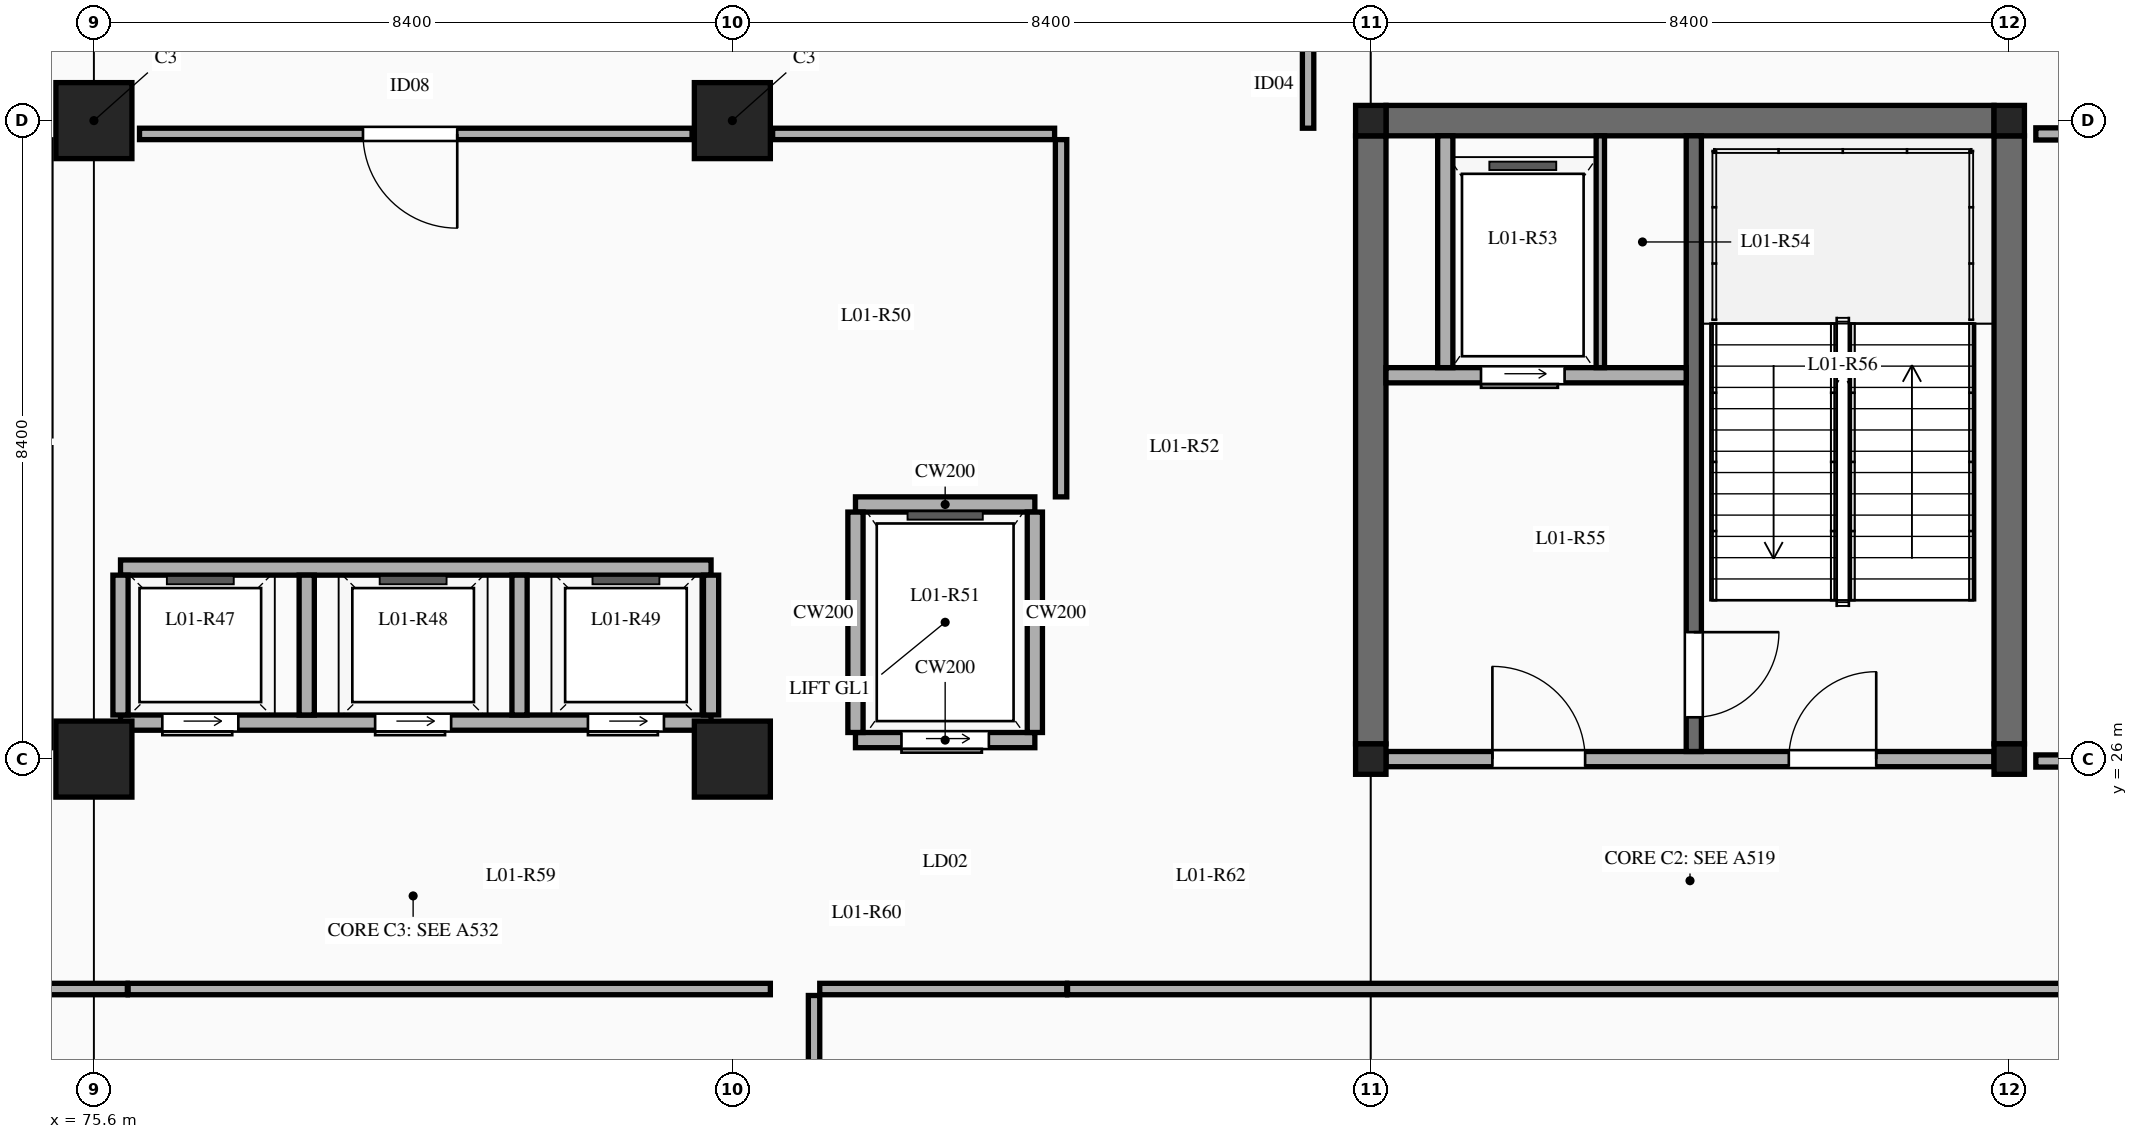
"""IFC4 building model, lengths in metres.
Left out: names, types, materials, properties, quantities, classifications, styles, units other than length and angle.
Written with IfcOpenShell. Run it as: python <this file> out.ifc"""

import sys

from ifc_helpers import new_model, si_unit, direction, frame, frame_2d, origin, origin_2d, place, context, subcontext, project, spatial, rectangle, extrude, element, fill, save


model = new_model("IFC4")
c1 = context("Model", 3, precision=1e-05, world=origin(), true_north=direction((0.0, 1.0)))
c2 = subcontext(c1, "Body", "Model", "MODEL_VIEW")
j1 = project(units=[si_unit("LENGTHUNIT", "METRE"), si_unit("PLANEANGLEUNIT", "RADIAN")], contexts=[c1])
p1 = place(None, origin())
s1 = spatial("IfcSite", under=j1, at=p1, CompositionType="ELEMENT")
p2 = place(p1, origin())
s2 = spatial("IfcBuilding", under=s1, at=p2, CompositionType="ELEMENT")
p3 = place(p2, frame((0.0, 0.0, 5.4)))
s3 = spatial("IfcBuildingStorey", under=s2, at=p3, CompositionType="ELEMENT", Elevation=5.4)
for number, where, z_axis, x_axis in (
    (1, (75.6, 26.0, 0.0), (0.0, 0.0, 1.0), (1.0, 0.0, 0.0)),
    (2, (75.6, 34.4, 0.0), (0.0, 0.0, 1.0), (1.0, 0.0, 0.0)),
    (3, (84.0, 26.0, 0.0), (0.0, 0.0, 1.0), (1.0, 0.0, 0.0)),
    (4, (84.0, 34.4, 0.0), (0.0, 0.0, 1.0), (1.0, 0.0, 0.0)),
):
    element("IfcColumn", number, at=place(p3, frame(where, z_axis=z_axis, x_axis=x_axis)), inside=s3, PredefinedType="COLUMN", context=c2, shape_type="SweptSolid", body=[
        extrude(rectangle(XDim=1.0, YDim=1.0, at=origin_2d()), origin(), (0.0, 0.0, 1.0), 4.8),
    ])
for number, where, z_axis, x_axis in (
    (5, (92.4, 26.0, 0.0), (0.0, 0.0, 1.0), (1.0, 0.0, 0.0)),
    (6, (92.4, 34.4, 0.0), (0.0, 0.0, 1.0), (1.0, 0.0, 0.0)),
    (7, (100.8, 26.0, 0.0), (0.0, 0.0, 1.0), (1.0, 0.0, 0.0)),
    (8, (100.8, 34.4, 0.0), (0.0, 0.0, 1.0), (1.0, 0.0, 0.0)),
):
    element("IfcColumn", number, at=place(p3, frame(where, z_axis=z_axis, x_axis=x_axis)), inside=s3, PredefinedType="COLUMN", context=c2, shape_type="SweptSolid", body=[
        extrude(rectangle(XDim=0.4, YDim=0.4, at=origin_2d()), origin(), (0.0, 0.0, 1.0), 4.8),
    ])
for number, where, z_axis, x_axis in (
    (9, (92.4, 26.2, 0.0), (0.0, 0.0, 1.0), (0.0, 1.0, 0.0)),
    (10, (100.8, 26.2, 0.0), (0.0, 0.0, 1.0), (0.0, 1.0, 0.0)),
    (11, (92.6, 34.4, 0.0), (0.0, 0.0, 1.0), (1.0, 0.0, 0.0)),
):
    element("IfcWall", number, at=place(p3, frame(where, z_axis=z_axis, x_axis=x_axis)), inside=s3, PredefinedType="SHEAR", context=c2, shape_type="SweptSolid", body=[
        extrude(rectangle(XDim=8.0, YDim=0.4, at=frame_2d((4.0, 0.0))), origin(), (0.0, 0.0, 1.0), 4.8),
    ])
p4 = place(p3, frame((92.6, 26.0, 0.0), z_axis=(0.0, 0.0, 1.0), x_axis=(1.0, 0.0, 0.0)))
e12 = element("IfcWall", 12, at=p4, inside=s3, PredefinedType="SOLIDWALL", context=c2, shape_type="SweptSolid", body=[
    extrude(rectangle(XDim=8.0, YDim=0.2, at=frame_2d((4.0, 0.0))), origin(), (0.0, 0.0, 1.0), 3.88),
])
p5 = place(p4, frame((1.4, 0.0, 0.0)))
e13 = element("IfcOpeningElement", 13, at=p5, cuts=e12, PredefinedType="OPENING", context=c2, shape_type="SweptSolid", body=[
    extrude(rectangle(XDim=1.22, YDim=2.15, at=frame_2d((0.61, 1.075))), frame((0.0, 0.11, 0.0), z_axis=(0.0, -1.0, 0.0), x_axis=(1.0, 0.0, 0.0)), (0.0, 0.0, 1.0), 0.22),
])
p6 = place(p4, frame((5.3, 0.0, 0.0)))
e14 = element("IfcOpeningElement", 14, at=p6, cuts=e12, PredefinedType="OPENING", context=c2, shape_type="SweptSolid", body=[
    extrude(rectangle(XDim=1.15, YDim=2.15, at=frame_2d((0.575, 1.075))), frame((0.0, 0.11, 0.0), z_axis=(0.0, -1.0, 0.0), x_axis=(1.0, 0.0, 0.0)), (0.0, 0.0, 1.0), 0.22),
])
p7 = place(p3, frame((96.65, 26.1, 0.0), z_axis=(0.0, 0.0, 1.0), x_axis=(0.0, 1.0, 0.0)))
e15 = element("IfcWall", 15, at=p7, inside=s3, PredefinedType="SOLIDWALL", context=c2, shape_type="SweptSolid", body=[
    extrude(rectangle(XDim=8.1, YDim=0.2, at=frame_2d((4.05, 0.0))), origin(), (0.0, 0.0, 1.0), 4.58),
])
p8 = place(p7, frame((0.45, 0.0, 0.0)))
e16 = element("IfcOpeningElement", 16, at=p8, cuts=e15, PredefinedType="OPENING", context=c2, shape_type="SweptSolid", body=[
    extrude(rectangle(XDim=1.12, YDim=2.15, at=frame_2d((0.56, 1.075))), frame((0.0, 0.11, 0.0), z_axis=(0.0, -1.0, 0.0), x_axis=(1.0, 0.0, 0.0)), (0.0, 0.0, 1.0), 0.22),
])
p9 = place(p3, frame((92.6, 31.05, 0.0), z_axis=(0.0, 0.0, 1.0), x_axis=(1.0, 0.0, 0.0)))
e17 = element("IfcWall", 17, at=p9, inside=s3, PredefinedType="SOLIDWALL", context=c2, shape_type="SweptSolid", body=[
    extrude(rectangle(XDim=3.95, YDim=0.2, at=frame_2d((1.975, 0.0))), origin(), (0.0, 0.0, 1.0), 4.58),
])
p10 = place(p9, frame((1.25, 0.0, 0.0)))
e18 = element("IfcOpeningElement", 18, at=p10, cuts=e17, PredefinedType="OPENING", context=c2, shape_type="SweptSolid", body=[
    extrude(rectangle(XDim=1.1, YDim=2.15, at=frame_2d((0.55, 1.075))), frame((0.0, 0.11, 0.0), z_axis=(0.0, -1.0, 0.0), x_axis=(1.0, 0.0, 0.0)), (0.0, 0.0, 1.0), 0.22),
])
p11 = place(p3, frame((95.42, 31.15, 0.0), z_axis=(0.0, 0.0, 1.0), x_axis=(0.0, 1.0, 0.0)))
e19 = element("IfcWall", 19, at=p11, inside=s3, PredefinedType="PARTITIONING", context=c2, shape_type="SweptSolid", body=[
    extrude(rectangle(XDim=3.05, YDim=0.11, at=frame_2d((1.525, 0.0))), origin(), (0.0, 0.0, 1.0), 4.58),
])
p12 = place(p3, frame((93.38, 31.15, 0.0), z_axis=(0.0, 0.0, 1.0), x_axis=(0.0, 1.0, 0.0)))
e20 = element("IfcWall", 20, at=p12, inside=s3, PredefinedType="SOLIDWALL", context=c2, shape_type="SweptSolid", body=[
    extrude(rectangle(XDim=3.05, YDim=0.2, at=frame_2d((1.525, 0.0))), origin(), (0.0, 0.0, 1.0), 4.58),
])
p13 = place(p3, frame((75.95, 26.48, 0.0), z_axis=(0.0, 0.0, 1.0), x_axis=(1.0, 0.0, 0.0)))
e21 = element("IfcWall", 21, at=p13, inside=s3, PredefinedType="SOLIDWALL", context=c2, shape_type="SweptSolid", body=[
    extrude(rectangle(XDim=7.77, YDim=0.2, at=frame_2d((3.885, 0.0))), origin(), (0.0, 0.0, 1.0), 4.58),
])
p14 = place(p13, frame((0.55, 0.0, 0.0)))
e22 = element("IfcOpeningElement", 22, at=p14, cuts=e21, PredefinedType="OPENING", context=c2, shape_type="SweptSolid", body=[
    extrude(rectangle(XDim=1.0, YDim=2.15, at=frame_2d((0.5, 1.075))), frame((0.0, 0.11, 0.0), z_axis=(0.0, -1.0, 0.0), x_axis=(1.0, 0.0, 0.0)), (0.0, 0.0, 1.0), 0.22),
])
p15 = place(p13, frame((3.35, 0.0, 0.0)))
e23 = element("IfcOpeningElement", 23, at=p15, cuts=e21, PredefinedType="OPENING", context=c2, shape_type="SweptSolid", body=[
    extrude(rectangle(XDim=1.0, YDim=2.15, at=frame_2d((0.5, 1.075))), frame((0.0, 0.11, 0.0), z_axis=(0.0, -1.0, 0.0), x_axis=(1.0, 0.0, 0.0)), (0.0, 0.0, 1.0), 0.22),
])
p16 = place(p13, frame((6.15, 0.0, 0.0)))
e24 = element("IfcOpeningElement", 24, at=p16, cuts=e21, PredefinedType="OPENING", context=c2, shape_type="SweptSolid", body=[
    extrude(rectangle(XDim=1.0, YDim=2.15, at=frame_2d((0.5, 1.075))), frame((0.0, 0.11, 0.0), z_axis=(0.0, -1.0, 0.0), x_axis=(1.0, 0.0, 0.0)), (0.0, 0.0, 1.0), 0.22),
])
p17 = place(p3, frame((75.95, 28.52, 0.0), z_axis=(0.0, 0.0, 1.0), x_axis=(1.0, 0.0, 0.0)))
e25 = element("IfcWall", 25, at=p17, inside=s3, PredefinedType="SOLIDWALL", context=c2, shape_type="SweptSolid", body=[
    extrude(rectangle(XDim=7.77, YDim=0.2, at=frame_2d((3.885, 0.0))), origin(), (0.0, 0.0, 1.0), 4.58),
])
p18 = place(p3, frame((75.95, 26.58, 0.0), z_axis=(0.0, 0.0, 1.0), x_axis=(0.0, 1.0, 0.0)))
e26 = element("IfcWall", 26, at=p18, inside=s3, PredefinedType="SOLIDWALL", context=c2, shape_type="SweptSolid", body=[
    extrude(rectangle(XDim=1.84, YDim=0.2, at=frame_2d((0.92, 0.0))), origin(), (0.0, 0.0, 1.0), 3.93),
])
for number, where, z_axis, x_axis in (
    (27, (78.4, 26.58, 0.0), (0.0, 0.0, 1.0), (0.0, 1.0, 0.0)),
    (28, (81.2, 26.58, 0.0), (0.0, 0.0, 1.0), (0.0, 1.0, 0.0)),
):
    element("IfcWall", number, at=place(p3, frame(where, z_axis=z_axis, x_axis=x_axis)), inside=s3, PredefinedType="SOLIDWALL", context=c2, shape_type="SweptSolid", body=[
        extrude(rectangle(XDim=1.84, YDim=0.2, at=frame_2d((0.92, 0.0))), origin(), (0.0, 0.0, 1.0), 4.58),
    ])
p19 = place(p3, frame((83.72, 26.58, 0.0), z_axis=(0.0, 0.0, 1.0), x_axis=(0.0, 1.0, 0.0)))
e29 = element("IfcWall", 29, at=p19, inside=s3, PredefinedType="SOLIDWALL", context=c2, shape_type="SweptSolid", body=[
    extrude(rectangle(XDim=1.84, YDim=0.2, at=frame_2d((0.92, 0.0))), origin(), (0.0, 0.0, 1.0), 3.93),
])
p20 = place(p3, frame((85.62, 26.25, 0.0), z_axis=(0.0, 0.0, 1.0), x_axis=(1.0, 0.0, 0.0)))
e30 = element("IfcWall", 30, at=p20, inside=s3, PredefinedType="SOLIDWALL", context=c2, shape_type="SweptSolid", body=[
    extrude(rectangle(XDim=2.36, YDim=0.2, at=frame_2d((1.18, 0.0))), origin(), (0.0, 0.0, 1.0), 3.88),
])
p21 = place(p20, frame((0.605, 0.0, 0.0)))
e31 = element("IfcOpeningElement", 31, at=p21, cuts=e30, PredefinedType="OPENING", context=c2, shape_type="SweptSolid", body=[
    extrude(rectangle(XDim=1.15, YDim=2.2, at=frame_2d((0.575, 1.1))), frame((0.0, 0.11, 0.0), z_axis=(0.0, -1.0, 0.0), x_axis=(1.0, 0.0, 0.0)), (0.0, 0.0, 1.0), 0.22),
])
p22 = place(p3, frame((85.62, 29.35, 0.0), z_axis=(0.0, 0.0, 1.0), x_axis=(1.0, 0.0, 0.0)))
e32 = element("IfcWall", 32, at=p22, inside=s3, PredefinedType="SOLIDWALL", context=c2, shape_type="SweptSolid", body=[
    extrude(rectangle(XDim=2.36, YDim=0.2, at=frame_2d((1.18, 0.0))), origin(), (0.0, 0.0, 1.0), 4.58),
])
p23 = place(p3, frame((85.62, 26.35, 0.0), z_axis=(0.0, 0.0, 1.0), x_axis=(0.0, 1.0, 0.0)))
e33 = element("IfcWall", 33, at=p23, inside=s3, PredefinedType="SOLIDWALL", context=c2, shape_type="SweptSolid", body=[
    extrude(rectangle(XDim=2.9, YDim=0.2, at=frame_2d((1.45, 0.0))), origin(), (0.0, 0.0, 1.0), 4.58),
])
p24 = place(p3, frame((87.98, 26.35, 0.0), z_axis=(0.0, 0.0, 1.0), x_axis=(0.0, 1.0, 0.0)))
e34 = element("IfcWall", 34, at=p24, inside=s3, PredefinedType="SOLIDWALL", context=c2, shape_type="SweptSolid", body=[
    extrude(rectangle(XDim=2.9, YDim=0.2, at=frame_2d((1.45, 0.0))), origin(), (0.0, 0.0, 1.0), 4.23),
])
p25 = place(p3, frame((88.325, 29.45, 0.0), z_axis=(0.0, 0.0, 1.0), x_axis=(0.0, 1.0, 0.0)))
e35 = element("IfcWall", 35, at=p25, inside=s3, PredefinedType="PARTITIONING", context=c2, shape_type="SweptSolid", body=[
    extrude(rectangle(XDim=4.7, YDim=0.15, at=frame_2d((2.35, 0.0))), origin(), (0.0, 0.0, 1.0), 2.95),
])
p26 = place(p3, frame((76.2, 34.225, 0.0), z_axis=(0.0, 0.0, 1.0), x_axis=(1.0, 0.0, 0.0)))
e36 = element("IfcWall", 36, at=p26, inside=s3, PredefinedType="PARTITIONING", context=c2, shape_type="SweptSolid", body=[
    extrude(rectangle(XDim=7.27, YDim=0.15, at=frame_2d((3.635, 0.0))), origin(), (0.0, 0.0, 1.0), 2.95),
])
p27 = place(p26, frame((2.94, 0.0, 0.0)))
e37 = element("IfcOpeningElement", 37, at=p27, cuts=e36, PredefinedType="OPENING", context=c2, shape_type="SweptSolid", body=[
    extrude(rectangle(XDim=1.24, YDim=2.2, at=frame_2d((0.62, 1.1))), frame((0.0, 0.085, 0.0), z_axis=(0.0, -1.0, 0.0), x_axis=(1.0, 0.0, 0.0)), (0.0, 0.0, 1.0), 0.17),
])
p28 = place(p3, frame((84.53, 34.225, 0.0), z_axis=(0.0, 0.0, 1.0), x_axis=(1.0, 0.0, 0.0)))
e38 = element("IfcWall", 38, at=p28, inside=s3, PredefinedType="PARTITIONING", context=c2, shape_type="SweptSolid", body=[
    extrude(rectangle(XDim=3.71, YDim=0.15, at=frame_2d((1.855, 0.0))), origin(), (0.0, 0.0, 1.0), 2.95),
])
p29 = place(p3, frame((101.15, 25.975, 0.0), z_axis=(0.0, 0.0, 1.0), x_axis=(1.0, 0.0, 0.0)))
e39 = element("IfcWall", 39, at=p29, inside=s3, PredefinedType="PARTITIONING", context=c2, shape_type="SweptSolid", body=[
    extrude(rectangle(XDim=7.545, YDim=0.16, at=frame_2d((3.772, 0.0))), origin(), (0.0, 0.0, 1.0), 2.95),
])
p30 = place(p29, frame((3.127, 0.0, 0.0)))
e40 = element("IfcOpeningElement", 40, at=p30, cuts=e39, PredefinedType="OPENING", context=c2, shape_type="SweptSolid", body=[
    extrude(rectangle(XDim=1.14, YDim=2.22, at=frame_2d((0.57, 1.11))), frame((0.0, 0.09, 0.0), z_axis=(0.0, -1.0, 0.0), x_axis=(1.0, 0.0, 0.0)), (0.0, 0.0, 1.0), 0.18),
])
p31 = place(p3, frame((101.15, 34.225, 0.0), z_axis=(0.0, 0.0, 1.0), x_axis=(1.0, 0.0, 0.0)))
e41 = element("IfcWall", 41, at=p31, inside=s3, PredefinedType="PARTITIONING", context=c2, shape_type="SweptSolid", body=[
    extrude(rectangle(XDim=7.545, YDim=0.16, at=frame_2d((3.772, 0.0))), origin(), (0.0, 0.0, 1.0), 2.95),
])
p32 = place(p3, frame((76.05, 22.975, 0.0), z_axis=(0.0, 0.0, 1.0), x_axis=(1.0, 0.0, 0.0)))
e42 = element("IfcWall", 42, at=p32, inside=s3, PredefinedType="PARTITIONING", context=c2, shape_type="SweptSolid", body=[
    extrude(rectangle(XDim=8.45, YDim=0.15, at=frame_2d((4.225, 0.0))), origin(), (0.0, 0.0, 1.0), 2.95),
])
p33 = place(p3, frame((85.15, 22.975, 0.0), z_axis=(0.0, 0.0, 1.0), x_axis=(1.0, 0.0, 0.0)))
e43 = element("IfcWall", 43, at=p33, inside=s3, PredefinedType="PARTITIONING", context=c2, shape_type="SweptSolid", body=[
    extrude(rectangle(XDim=3.25, YDim=0.15, at=frame_2d((1.625, 0.0))), origin(), (0.0, 0.0, 1.0), 2.95),
])
p34 = place(p3, frame((63.55, 22.975, 0.0), z_axis=(0.0, 0.0, 1.0), x_axis=(1.0, 0.0, 0.0)))
e44 = element("IfcWall", 44, at=p34, inside=s3, PredefinedType="PARTITIONING", context=c2, shape_type="SweptSolid", body=[
    extrude(rectangle(XDim=12.49, YDim=0.15, at=frame_2d((6.245, 0.0))), origin(), (0.0, 0.0, 1.0), 2.95),
])
p35 = place(p3, frame((88.41, 22.975, 0.0), z_axis=(0.0, 0.0, 1.0), x_axis=(1.0, 0.0, 0.0)))
e45 = element("IfcWall", 45, at=p35, inside=s3, PredefinedType="PARTITIONING", context=c2, shape_type="SweptSolid", body=[
    extrude(rectangle(XDim=20.34, YDim=0.15, at=frame_2d((10.17, 0.0))), origin(), (0.0, 0.0, 1.0), 2.95),
])
p36 = place(p3, frame((85.075, 13.96, 0.0), z_axis=(0.0, 0.0, 1.0), x_axis=(0.0, 1.0, 0.0)))
e46 = element("IfcWall", 46, at=p36, inside=s3, PredefinedType="PARTITIONING", context=c2, shape_type="SweptSolid", body=[
    extrude(rectangle(XDim=8.93, YDim=0.15, at=frame_2d((4.465, 0.0))), origin(), (0.0, 0.0, 1.0), 2.95),
])
p37 = place(p3, frame((91.575, 34.3, 0.0), z_axis=(0.0, 0.0, 1.0), x_axis=(0.0, 1.0, 0.0)))
e47 = element("IfcWall", 47, at=p37, inside=s3, PredefinedType="PARTITIONING", context=c2, shape_type="SweptSolid", body=[
    extrude(rectangle(XDim=2.785, YDim=0.15, at=frame_2d((1.393, 0.0))), origin(), (0.0, 0.0, 1.0), 2.95),
])
p38 = place(p37, frame((1.035, 0.0, 0.0)))
e48 = element("IfcOpeningElement", 48, at=p38, cuts=e47, PredefinedType="OPENING", context=c2, shape_type="SweptSolid", body=[
    extrude(rectangle(XDim=1.5, YDim=2.3, at=frame_2d((0.75, 1.15))), frame((0.0, 0.085, 0.0), z_axis=(0.0, -1.0, 0.0), x_axis=(1.0, 0.0, 0.0)), (0.0, 0.0, 1.0), 0.17),
])
p39 = place(p5, origin())
e49 = element("IfcDoor", 49, at=p39, inside=s3, OperationType="SINGLE_SWING_LEFT", PredefinedType="DOOR", context=c2, shape_type="SweptSolid", body=[
    extrude(rectangle(XDim=1.22, YDim=2.15, at=frame_2d((0.61, 1.075))), frame((0.0, 0.025, 0.0), z_axis=(0.0, -1.0, 0.0), x_axis=(1.0, 0.0, 0.0)), (0.0, 0.0, 1.0), 0.05),
])
fill(e13, e49)
p40 = place(p6, origin())
e50 = element("IfcDoor", 50, at=p40, inside=s3, OperationType="SINGLE_SWING_RIGHT", PredefinedType="DOOR", context=c2, shape_type="SweptSolid", body=[
    extrude(rectangle(XDim=1.15, YDim=2.15, at=frame_2d((0.575, 1.075))), frame((0.0, 0.025, 0.0), z_axis=(0.0, -1.0, 0.0), x_axis=(1.0, 0.0, 0.0)), (0.0, 0.0, 1.0), 0.05),
])
fill(e14, e50)
p41 = place(p8, frame((1.12, 0.0, 0.0), z_axis=(0.0, 0.0, 1.0), x_axis=(-1.0, 0.0, 0.0)))
e51 = element("IfcDoor", 51, at=p41, inside=s3, OperationType="SINGLE_SWING_LEFT", PredefinedType="DOOR", context=c2, shape_type="SweptSolid", body=[
    extrude(rectangle(XDim=1.12, YDim=2.15, at=frame_2d((0.56, 1.075))), frame((0.0, 0.025, 0.0), z_axis=(0.0, -1.0, 0.0), x_axis=(1.0, 0.0, 0.0)), (0.0, 0.0, 1.0), 0.05),
])
fill(e16, e51)
p42 = place(p10, frame((1.1, 0.0, 0.0), z_axis=(0.0, 0.0, 1.0), x_axis=(-1.0, 0.0, 0.0)))
e52 = element("IfcDoor", 52, at=p42, inside=s3, OperationType="SLIDING_TO_LEFT", PredefinedType="DOOR", context=c2, shape_type="SweptSolid", body=[
    extrude(rectangle(XDim=1.1, YDim=2.15, at=frame_2d((0.55, 1.075))), frame((0.0, 0.025, 0.0), z_axis=(0.0, -1.0, 0.0), x_axis=(1.0, 0.0, 0.0)), (0.0, 0.0, 1.0), 0.05),
])
fill(e18, e52)
p43 = place(p14, frame((1.0, 0.0, 0.0), z_axis=(0.0, 0.0, 1.0), x_axis=(-1.0, 0.0, 0.0)))
e53 = element("IfcDoor", 53, at=p43, inside=s3, OperationType="SLIDING_TO_LEFT", PredefinedType="DOOR", context=c2, shape_type="SweptSolid", body=[
    extrude(rectangle(XDim=1.0, YDim=2.15, at=frame_2d((0.5, 1.075))), frame((0.0, 0.025, 0.0), z_axis=(0.0, -1.0, 0.0), x_axis=(1.0, 0.0, 0.0)), (0.0, 0.0, 1.0), 0.05),
])
fill(e22, e53)
p44 = place(p15, frame((1.0, 0.0, 0.0), z_axis=(0.0, 0.0, 1.0), x_axis=(-1.0, 0.0, 0.0)))
e54 = element("IfcDoor", 54, at=p44, inside=s3, OperationType="SLIDING_TO_LEFT", PredefinedType="DOOR", context=c2, shape_type="SweptSolid", body=[
    extrude(rectangle(XDim=1.0, YDim=2.15, at=frame_2d((0.5, 1.075))), frame((0.0, 0.025, 0.0), z_axis=(0.0, -1.0, 0.0), x_axis=(1.0, 0.0, 0.0)), (0.0, 0.0, 1.0), 0.05),
])
fill(e23, e54)
p45 = place(p16, frame((1.0, 0.0, 0.0), z_axis=(0.0, 0.0, 1.0), x_axis=(-1.0, 0.0, 0.0)))
e55 = element("IfcDoor", 55, at=p45, inside=s3, OperationType="SLIDING_TO_LEFT", PredefinedType="DOOR", context=c2, shape_type="SweptSolid", body=[
    extrude(rectangle(XDim=1.0, YDim=2.15, at=frame_2d((0.5, 1.075))), frame((0.0, 0.025, 0.0), z_axis=(0.0, -1.0, 0.0), x_axis=(1.0, 0.0, 0.0)), (0.0, 0.0, 1.0), 0.05),
])
fill(e24, e55)
p46 = place(p21, frame((1.15, 0.0, 0.0), z_axis=(0.0, 0.0, 1.0), x_axis=(-1.0, 0.0, 0.0)))
e56 = element("IfcDoor", 56, at=p46, inside=s3, OperationType="SLIDING_TO_LEFT", PredefinedType="DOOR", context=c2, shape_type="SweptSolid", body=[
    extrude(rectangle(XDim=1.15, YDim=2.2, at=frame_2d((0.575, 1.1))), frame((0.0, 0.025, 0.0), z_axis=(0.0, -1.0, 0.0), x_axis=(1.0, 0.0, 0.0)), (0.0, 0.0, 1.0), 0.05),
])
fill(e31, e56)
p47 = place(p27, frame((1.24, 0.0, 0.0), z_axis=(0.0, 0.0, 1.0), x_axis=(-1.0, 0.0, 0.0)))
e57 = element("IfcDoor", 57, at=p47, inside=s3, OperationType="SINGLE_SWING_LEFT", PredefinedType="DOOR", context=c2, shape_type="SweptSolid", body=[
    extrude(rectangle(XDim=1.24, YDim=2.2, at=frame_2d((0.62, 1.1))), frame((0.0, 0.025, 0.0), z_axis=(0.0, -1.0, 0.0), x_axis=(1.0, 0.0, 0.0)), (0.0, 0.0, 1.0), 0.05),
])
fill(e37, e57)
save(model, sys.argv[1])
